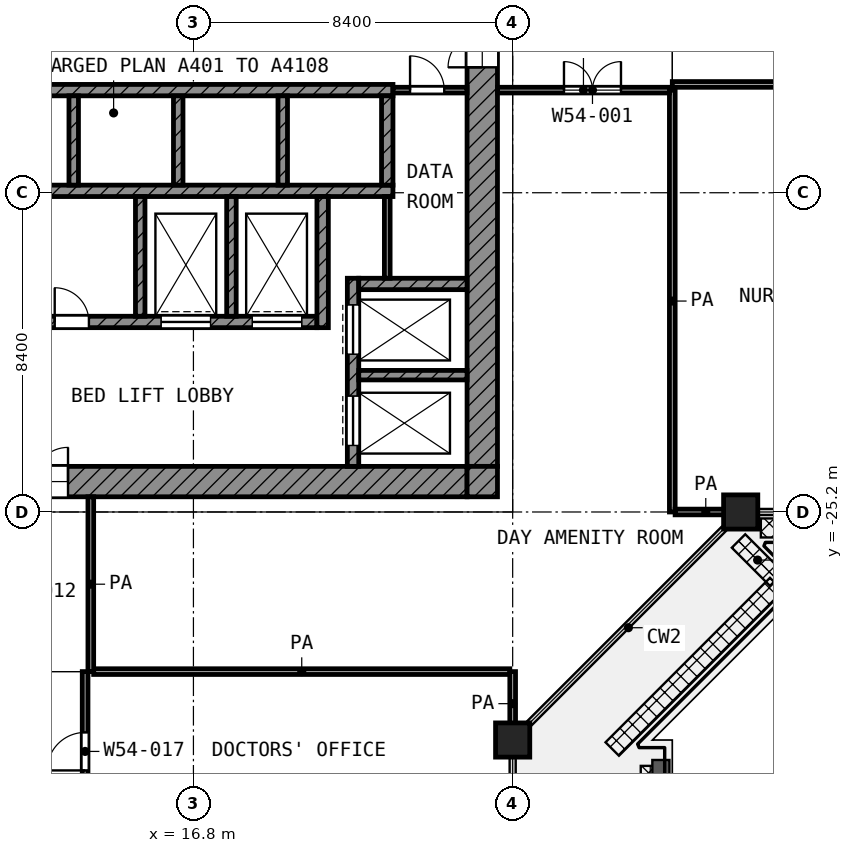
"""IFC4 building model, lengths in metres.
Left out: names, types, materials, properties, quantities, classifications, styles, units other than length and angle.
Written with IfcOpenShell. Run it as: python <this file> out.ifc"""

import sys

from ifc_helpers import new_model, si_unit, direction, frame, frame_2d, origin, origin_2d, place, context, subcontext, project, spatial, rectangle, extrude, element, fill, save


model = new_model("IFC4")
c1 = context("Model", 3, precision=1e-05, world=origin(), true_north=direction((0.0, 1.0)))
c2 = subcontext(c1, "Body", "Model", "MODEL_VIEW")
j1 = project(units=[si_unit("LENGTHUNIT", "METRE"), si_unit("PLANEANGLEUNIT", "RADIAN")], contexts=[c1])
p1 = place(None, origin())
s1 = spatial("IfcSite", under=j1, at=p1, CompositionType="ELEMENT")
p2 = place(p1, origin())
s2 = spatial("IfcBuilding", under=s1, at=p2, CompositionType="ELEMENT")
p3 = place(p2, frame((0.0, 0.0, 234.8)))
s3 = spatial("IfcBuildingStorey", under=s2, at=p3, CompositionType="ELEMENT", Elevation=234.8)
for number, where, z_axis, x_axis in (
    (1, (31.2, -25.2, 0.0), (0.0, 0.0, 1.0), (1.0, 0.0, 0.0)),
    (2, (25.2, -31.2, 0.0), (0.0, 0.0, 1.0), (1.0, 0.0, 0.0)),
):
    element("IfcColumn", number, at=place(p3, frame(where, z_axis=z_axis, x_axis=x_axis)), inside=s3, PredefinedType="COLUMN", context=c2, shape_type="SweptSolid", body=[
        extrude(rectangle(XDim=0.9, YDim=0.9, at=origin_2d()), origin(), (0.0, 0.0, 1.0), 4.2),
    ])
p4 = place(p3, frame((24.4, -24.0, 0.0), z_axis=(0.0, 0.0, 1.0), x_axis=(0.0, 1.0, 0.0)))
e3 = element("IfcWall", 3, at=p4, inside=s3, PredefinedType="SHEAR", context=c2, shape_type="SweptSolid", body=[
    extrude(rectangle(XDim=18.6, YDim=0.8, at=frame_2d((9.3, 0.0))), origin(), (0.0, 0.0, 1.0), 3.6),
])
p5 = place(p4, frame((10.5, 0.0, 0.0)))
e4 = element("IfcOpeningElement", 4, at=p5, cuts=e3, PredefinedType="OPENING", context=c2, shape_type="SweptSolid", body=[
    extrude(rectangle(XDim=1.8, YDim=2.1, at=frame_2d((0.9, 1.05))), frame((0.0, 0.41, 0.0), z_axis=(0.0, -1.0, 0.0), x_axis=(1.0, 0.0, 0.0)), (0.0, 0.0, 1.0), 0.82),
])
p6 = place(p3, frame((5.4, -24.4, 0.0), z_axis=(0.0, 0.0, 1.0), x_axis=(1.0, 0.0, 0.0)))
e5 = element("IfcWall", 5, at=p6, inside=s3, PredefinedType="SHEAR", context=c2, shape_type="SweptSolid", body=[
    extrude(rectangle(XDim=18.6, YDim=0.8, at=frame_2d((9.3, 0.0))), origin(), (0.0, 0.0, 1.0), 3.6),
])
p7 = place(p6, frame((6.3, 0.0, 0.0)))
e6 = element("IfcOpeningElement", 6, at=p7, cuts=e5, PredefinedType="OPENING", context=c2, shape_type="SweptSolid", body=[
    extrude(rectangle(XDim=1.8, YDim=2.1, at=frame_2d((0.9, 1.05))), frame((0.0, 0.41, 0.0), z_axis=(0.0, -1.0, 0.0), x_axis=(1.0, 0.0, 0.0)), (0.0, 0.0, 1.0), 0.82),
])
p8 = place(p3, frame((24.4, -24.8, 0.0), z_axis=(0.0, 0.0, 1.0), x_axis=(0.0, 1.0, 0.0)))
e7 = element("IfcWall", 7, at=p8, inside=s3, PredefinedType="SHEAR", context=c2, shape_type="SweptSolid", body=[
    extrude(rectangle(XDim=0.8, YDim=0.8, at=frame_2d((0.4, 0.0))), origin(), (0.0, 0.0, 1.0), 3.6),
])
p9 = place(p3, frame((5.4, -14.1, 0.0), z_axis=(0.0, 0.0, 1.0), x_axis=(1.0, 0.0, 0.0)))
e8 = element("IfcWall", 8, at=p9, inside=s3, PredefinedType="SHEAR", context=c2, shape_type="SweptSolid", body=[
    extrude(rectangle(XDim=16.65, YDim=0.3, at=frame_2d((8.325, 0.0))), origin(), (0.0, 0.0, 1.0), 3.6),
])
p10 = place(p9, frame((0.825, 0.0, 0.0)))
e9 = element("IfcOpeningElement", 9, at=p10, cuts=e8, PredefinedType="OPENING", context=c2, shape_type="SweptSolid", body=[
    extrude(rectangle(XDim=1.1, YDim=2.1, at=frame_2d((0.55, 1.05))), frame((0.0, 0.16, 0.0), z_axis=(0.0, -1.0, 0.0), x_axis=(1.0, 0.0, 0.0)), (0.0, 0.0, 1.0), 0.32),
])
p11 = place(p9, frame((3.575, 0.0, 0.0)))
e10 = element("IfcOpeningElement", 10, at=p11, cuts=e8, PredefinedType="OPENING", context=c2, shape_type="SweptSolid", body=[
    extrude(rectangle(XDim=1.1, YDim=2.1, at=frame_2d((0.55, 1.05))), frame((0.0, 0.16, 0.0), z_axis=(0.0, -1.0, 0.0), x_axis=(1.0, 0.0, 0.0)), (0.0, 0.0, 1.0), 0.32),
])
p12 = place(p3, frame((5.4, -16.75, 0.0), z_axis=(0.0, 0.0, 1.0), x_axis=(1.0, 0.0, 0.0)))
e11 = element("IfcWall", 11, at=p12, inside=s3, PredefinedType="SHEAR", context=c2, shape_type="SweptSolid", body=[
    extrude(rectangle(XDim=16.65, YDim=0.3, at=frame_2d((8.325, 0.0))), origin(), (0.0, 0.0, 1.0), 3.6),
])
p13 = place(p3, frame((5.4, -20.2, 0.0), z_axis=(0.0, 0.0, 1.0), x_axis=(1.0, 0.0, 0.0)))
e12 = element("IfcWall", 12, at=p13, inside=s3, PredefinedType="SHEAR", context=c2, shape_type="SweptSolid", body=[
    extrude(rectangle(XDim=14.65, YDim=0.3, at=frame_2d((7.325, 0.0))), origin(), (0.0, 0.0, 1.0), 3.6),
])
p14 = place(p13, frame((10.55, 0.0, 0.0)))
e13 = element("IfcOpeningElement", 13, at=p14, cuts=e12, PredefinedType="OPENING", context=c2, shape_type="SweptSolid", body=[
    extrude(rectangle(XDim=1.3, YDim=2.1, at=frame_2d((0.65, 1.05))), frame((0.0, 0.16, 0.0), z_axis=(0.0, -1.0, 0.0), x_axis=(1.0, 0.0, 0.0)), (0.0, 0.0, 1.0), 0.32),
])
p15 = place(p13, frame((12.95, 0.0, 0.0)))
e14 = element("IfcOpeningElement", 14, at=p15, cuts=e12, PredefinedType="OPENING", context=c2, shape_type="SweptSolid", body=[
    extrude(rectangle(XDim=1.3, YDim=2.1, at=frame_2d((0.65, 1.05))), frame((0.0, 0.16, 0.0), z_axis=(0.0, -1.0, 0.0), x_axis=(1.0, 0.0, 0.0)), (0.0, 0.0, 1.0), 0.32),
])
p16 = place(p13, frame((0.55, 0.0, 0.0)))
e15 = element("IfcOpeningElement", 15, at=p16, cuts=e12, PredefinedType="OPENING", context=c2, shape_type="SweptSolid", body=[
    extrude(rectangle(XDim=1.3, YDim=2.1, at=frame_2d((0.65, 1.05))), frame((0.0, 0.16, 0.0), z_axis=(0.0, -1.0, 0.0), x_axis=(1.0, 0.0, 0.0)), (0.0, 0.0, 1.0), 0.32),
])
p17 = place(p13, frame((2.95, 0.0, 0.0)))
e16 = element("IfcOpeningElement", 16, at=p17, cuts=e12, PredefinedType="OPENING", context=c2, shape_type="SweptSolid", body=[
    extrude(rectangle(XDim=1.3, YDim=2.1, at=frame_2d((0.65, 1.05))), frame((0.0, 0.16, 0.0), z_axis=(0.0, -1.0, 0.0), x_axis=(1.0, 0.0, 0.0)), (0.0, 0.0, 1.0), 0.32),
])
p18 = place(p13, frame((5.35, 0.0, 0.0)))
e17 = element("IfcOpeningElement", 17, at=p18, cuts=e12, PredefinedType="OPENING", context=c2, shape_type="SweptSolid", body=[
    extrude(rectangle(XDim=0.9, YDim=2.1, at=frame_2d((0.45, 1.05))), frame((0.0, 0.16, 0.0), z_axis=(0.0, -1.0, 0.0), x_axis=(1.0, 0.0, 0.0)), (0.0, 0.0, 1.0), 0.32),
])
p19 = place(p13, frame((7.75, 0.0, 0.0)))
e18 = element("IfcOpeningElement", 18, at=p19, cuts=e12, PredefinedType="OPENING", context=c2, shape_type="SweptSolid", body=[
    extrude(rectangle(XDim=0.9, YDim=2.1, at=frame_2d((0.45, 1.05))), frame((0.0, 0.16, 0.0), z_axis=(0.0, -1.0, 0.0), x_axis=(1.0, 0.0, 0.0)), (0.0, 0.0, 1.0), 0.32),
])
p20 = place(p3, frame((20.2, -20.35, 0.0), z_axis=(0.0, 0.0, 1.0), x_axis=(0.0, 1.0, 0.0)))
e19 = element("IfcWall", 19, at=p20, inside=s3, PredefinedType="SHEAR", context=c2, shape_type="SweptSolid", body=[
    extrude(rectangle(XDim=3.45, YDim=0.3, at=frame_2d((1.725, 0.0))), origin(), (0.0, 0.0, 1.0), 3.6),
])
p21 = place(p3, frame((21.9, -16.6, 0.0), z_axis=(0.0, 0.0, 1.0), x_axis=(0.0, 1.0, 0.0)))
e20 = element("IfcWall", 20, at=p21, inside=s3, PredefinedType="SHEAR", context=c2, shape_type="SweptSolid", body=[
    extrude(rectangle(XDim=2.35, YDim=0.3, at=frame_2d((1.175, 0.0))), origin(), (0.0, 0.0, 1.0), 3.6),
])
p22 = place(p3, frame((21.15, -19.2, 0.0), z_axis=(0.0, 0.0, 1.0), x_axis=(1.0, 0.0, 0.0)))
e21 = element("IfcWall", 21, at=p22, inside=s3, PredefinedType="SHEAR", context=c2, shape_type="SweptSolid", body=[
    extrude(rectangle(XDim=2.85, YDim=0.3, at=frame_2d((1.425, 0.0))), origin(), (0.0, 0.0, 1.0), 3.6),
])
p23 = place(p3, frame((21.0, -24.0, 0.0), z_axis=(0.0, 0.0, 1.0), x_axis=(0.0, 1.0, 0.0)))
e22 = element("IfcWall", 22, at=p23, inside=s3, PredefinedType="SHEAR", context=c2, shape_type="SweptSolid", body=[
    extrude(rectangle(XDim=4.95, YDim=0.3, at=frame_2d((2.475, 0.0))), origin(), (0.0, 0.0, 1.0), 3.6),
])
p24 = place(p23, frame((2.95, 0.0, 0.0)))
e23 = element("IfcOpeningElement", 23, at=p24, cuts=e22, PredefinedType="OPENING", context=c2, shape_type="SweptSolid", body=[
    extrude(rectangle(XDim=1.3, YDim=2.1, at=frame_2d((0.65, 1.05))), frame((0.0, 0.16, 0.0), z_axis=(0.0, -1.0, 0.0), x_axis=(1.0, 0.0, 0.0)), (0.0, 0.0, 1.0), 0.32),
])
p25 = place(p23, frame((0.55, 0.0, 0.0)))
e24 = element("IfcOpeningElement", 24, at=p25, cuts=e22, PredefinedType="OPENING", context=c2, shape_type="SweptSolid", body=[
    extrude(rectangle(XDim=1.3, YDim=2.1, at=frame_2d((0.65, 1.05))), frame((0.0, 0.16, 0.0), z_axis=(0.0, -1.0, 0.0), x_axis=(1.0, 0.0, 0.0)), (0.0, 0.0, 1.0), 0.32),
])
p26 = place(p3, frame((21.15, -21.6, 0.0), z_axis=(0.0, 0.0, 1.0), x_axis=(1.0, 0.0, 0.0)))
e25 = element("IfcWall", 25, at=p26, inside=s3, PredefinedType="SHEAR", context=c2, shape_type="SweptSolid", body=[
    extrude(rectangle(XDim=2.85, YDim=0.25, at=frame_2d((1.425, 0.0))), origin(), (0.0, 0.0, 1.0), 3.6),
])
for number, where, z_axis, x_axis in (
    (26, (15.4, -20.05, 0.0), (0.0, 0.0, 1.0), (0.0, 1.0, 0.0)),
    (27, (17.8, -20.05, 0.0), (0.0, 0.0, 1.0), (0.0, 1.0, 0.0)),
):
    element("IfcWall", number, at=place(p3, frame(where, z_axis=z_axis, x_axis=x_axis)), inside=s3, PredefinedType="SHEAR", context=c2, shape_type="SweptSolid", body=[
        extrude(rectangle(XDim=3.15, YDim=0.25, at=frame_2d((1.575, 0.0))), origin(), (0.0, 0.0, 1.0), 3.6),
    ])
for number, where, z_axis, x_axis in (
    (28, (13.65, -16.6, 0.0), (0.0, 0.0, 1.0), (0.0, 1.0, 0.0)),
    (29, (16.4, -16.6, 0.0), (0.0, 0.0, 1.0), (0.0, 1.0, 0.0)),
    (30, (19.15, -16.6, 0.0), (0.0, 0.0, 1.0), (0.0, 1.0, 0.0)),
):
    element("IfcWall", number, at=place(p3, frame(where, z_axis=z_axis, x_axis=x_axis)), inside=s3, PredefinedType="SHEAR", context=c2, shape_type="SweptSolid", body=[
        extrude(rectangle(XDim=2.35, YDim=0.25, at=frame_2d((1.175, 0.0))), origin(), (0.0, 0.0, 1.0), 3.6),
    ])
p27 = place(p3, frame((21.9, -19.05, 0.0), z_axis=(0.0, 0.0, 1.0), x_axis=(0.0, 1.0, 0.0)))
e31 = element("IfcWall", 31, at=p27, inside=s3, PredefinedType="PARTITIONING", context=c2, shape_type="SweptSolid", body=[
    extrude(rectangle(XDim=2.15, YDim=0.15, at=frame_2d((1.075, 0.0))), origin(), (0.0, 0.0, 1.0), 3.6),
])
p28 = place(p3, frame((22.05, -14.1, 0.0), z_axis=(0.0, 0.0, 1.0), x_axis=(1.0, 0.0, 0.0)))
e32 = element("IfcWall", 32, at=p28, inside=s3, PredefinedType="PARTITIONING", context=c2, shape_type="SweptSolid", body=[
    extrude(rectangle(XDim=1.95, YDim=0.15, at=frame_2d((0.975, 0.0))), origin(), (0.0, 0.0, 1.0), 3.6),
])
p29 = place(p28, frame((0.45, 0.0, 0.0)))
e33 = element("IfcOpeningElement", 33, at=p29, cuts=e32, PredefinedType="OPENING", context=c2, shape_type="SweptSolid", body=[
    extrude(rectangle(XDim=0.9, YDim=2.1, at=frame_2d((0.45, 1.05))), frame((0.0, 0.085, 0.0), z_axis=(0.0, -1.0, 0.0), x_axis=(1.0, 0.0, 0.0)), (0.0, 0.0, 1.0), 0.17),
])
p30 = place(p3, frame((14.175, -29.4, 0.0), z_axis=(0.0, 0.0, 1.0), x_axis=(1.0, 0.0, 0.0)))
e34 = element("IfcWall", 34, at=p30, inside=s3, PredefinedType="PARTITIONING", context=c2, shape_type="SweptSolid", body=[
    extrude(rectangle(XDim=10.95, YDim=0.15, at=frame_2d((5.475, 0.0))), origin(), (0.0, 0.0, 1.0), 3.6),
])
p31 = place(p3, frame((29.475, -25.2, 0.0), z_axis=(0.0, 0.0, 1.0), x_axis=(1.0, 0.0, 0.0)))
e35 = element("IfcWall", 35, at=p31, inside=s3, PredefinedType="PARTITIONING", context=c2, shape_type="SweptSolid", body=[
    extrude(rectangle(XDim=1.612, YDim=0.15, at=frame_2d((0.806, 0.0))), origin(), (0.0, 0.0, 1.0), 3.6),
])
p32 = place(p3, frame((24.8, -14.1, 0.0), z_axis=(0.0, 0.0, 1.0), x_axis=(1.0, 0.0, 0.0)))
e36 = element("IfcWall", 36, at=p32, inside=s3, PredefinedType="PARTITIONING", context=c2, shape_type="SweptSolid", body=[
    extrude(rectangle(XDim=4.525, YDim=0.15, at=frame_2d((2.262, 0.0))), origin(), (0.0, 0.0, 1.0), 3.6),
])
p33 = place(p32, frame((1.75, 0.0, 0.0)))
e37 = element("IfcOpeningElement", 37, at=p33, cuts=e36, PredefinedType="OPENING", context=c2, shape_type="SweptSolid", body=[
    extrude(rectangle(XDim=1.5, YDim=2.1, at=frame_2d((0.75, 1.05))), frame((0.0, 0.085, 0.0), z_axis=(0.0, -1.0, 0.0), x_axis=(1.0, 0.0, 0.0)), (0.0, 0.0, 1.0), 0.17),
])
p34 = place(p3, frame((29.4, -13.95, 0.0), z_axis=(0.0, 0.0, 1.0), x_axis=(1.0, 0.0, 0.0)))
e38 = element("IfcWall", 38, at=p34, inside=s3, PredefinedType="PARTITIONING", context=c2, shape_type="SweptSolid", body=[
    extrude(rectangle(XDim=33.52, YDim=0.15, at=frame_2d((16.76, 0.0))), origin(), (0.0, 0.0, 1.0), 2.7),
])
p35 = place(p34, frame((3.45, 0.0, 0.0)))
e39 = element("IfcOpeningElement", 39, at=p35, cuts=e38, PredefinedType="OPENING", context=c2, shape_type="SweptSolid", body=[
    extrude(rectangle(XDim=1.2, YDim=2.1, at=frame_2d((0.6, 1.05))), frame((0.0, 0.085, 0.0), z_axis=(0.0, -1.0, 0.0), x_axis=(1.0, 0.0, 0.0)), (0.0, 0.0, 1.0), 0.17),
])
p36 = place(p34, frame((11.2, 0.0, 0.0)))
e40 = element("IfcOpeningElement", 40, at=p36, cuts=e38, PredefinedType="OPENING", context=c2, shape_type="SweptSolid", body=[
    extrude(rectangle(XDim=1.2, YDim=2.1, at=frame_2d((0.6, 1.05))), frame((0.0, 0.085, 0.0), z_axis=(0.0, -1.0, 0.0), x_axis=(1.0, 0.0, 0.0)), (0.0, 0.0, 1.0), 0.17),
])
p37 = place(p34, frame((13.6, 0.0, 0.0)))
e41 = element("IfcOpeningElement", 41, at=p37, cuts=e38, PredefinedType="OPENING", context=c2, shape_type="SweptSolid", body=[
    extrude(rectangle(XDim=1.2, YDim=2.1, at=frame_2d((0.6, 1.05))), frame((0.0, 0.085, 0.0), z_axis=(0.0, -1.0, 0.0), x_axis=(1.0, 0.0, 0.0)), (0.0, 0.0, 1.0), 0.17),
])
p38 = place(p34, frame((21.075, 0.0, 0.0)))
e42 = element("IfcOpeningElement", 42, at=p38, cuts=e38, PredefinedType="OPENING", context=c2, shape_type="SweptSolid", body=[
    extrude(rectangle(XDim=1.2, YDim=2.1, at=frame_2d((0.6, 1.05))), frame((0.0, 0.085, 0.0), z_axis=(0.0, -1.0, 0.0), x_axis=(1.0, 0.0, 0.0)), (0.0, 0.0, 1.0), 0.17),
])
p39 = place(p34, frame((19.55, 0.0, 0.0)))
e43 = element("IfcOpeningElement", 43, at=p39, cuts=e38, PredefinedType="OPENING", context=c2, shape_type="SweptSolid", body=[
    extrude(rectangle(XDim=1.2, YDim=2.1, at=frame_2d((0.6, 1.05))), frame((0.0, 0.085, 0.0), z_axis=(0.0, -1.0, 0.0), x_axis=(1.0, 0.0, 0.0)), (0.0, 0.0, 1.0), 0.17),
])
p40 = place(p34, frame((22.95, 0.0, 0.0)))
e44 = element("IfcOpeningElement", 44, at=p40, cuts=e38, PredefinedType="OPENING", context=c2, shape_type="SweptSolid", body=[
    extrude(rectangle(XDim=1.2, YDim=2.1, at=frame_2d((0.6, 1.05))), frame((0.0, 0.085, 0.0), z_axis=(0.0, -1.0, 0.0), x_axis=(1.0, 0.0, 0.0)), (0.0, 0.0, 1.0), 0.17),
])
p41 = place(p34, frame((28.35, 0.0, 0.0)))
e45 = element("IfcOpeningElement", 45, at=p41, cuts=e38, PredefinedType="OPENING", context=c2, shape_type="SweptSolid", body=[
    extrude(rectangle(XDim=1.5, YDim=2.1, at=frame_2d((0.75, 1.05))), frame((0.0, 0.085, 0.0), z_axis=(0.0, -1.0, 0.0), x_axis=(1.0, 0.0, 0.0)), (0.0, 0.0, 1.0), 0.17),
])
p42 = place(p3, frame((13.95, -46.12, 0.0), z_axis=(0.0, 0.0, 1.0), x_axis=(0.0, 1.0, 0.0)))
e46 = element("IfcWall", 46, at=p42, inside=s3, PredefinedType="PARTITIONING", context=c2, shape_type="SweptSolid", body=[
    extrude(rectangle(XDim=16.72, YDim=0.15, at=frame_2d((8.36, 0.0))), origin(), (0.0, 0.0, 1.0), 3.6),
])
p43 = place(p42, frame((14.12, 0.0, 0.0)))
e47 = element("IfcOpeningElement", 47, at=p43, cuts=e46, PredefinedType="OPENING", context=c2, shape_type="SweptSolid", body=[
    extrude(rectangle(XDim=1.0, YDim=2.1, at=frame_2d((0.5, 1.05))), frame((0.0, 0.085, 0.0), z_axis=(0.0, -1.0, 0.0), x_axis=(1.0, 0.0, 0.0)), (0.0, 0.0, 1.0), 0.17),
])
p44 = place(p42, frame((9.82, 0.0, 0.0)))
e48 = element("IfcOpeningElement", 48, at=p44, cuts=e46, PredefinedType="OPENING", context=c2, shape_type="SweptSolid", body=[
    extrude(rectangle(XDim=1.2, YDim=2.1, at=frame_2d((0.6, 1.05))), frame((0.0, 0.085, 0.0), z_axis=(0.0, -1.0, 0.0), x_axis=(1.0, 0.0, 0.0)), (0.0, 0.0, 1.0), 0.17),
])
p45 = place(p42, frame((5.72, 0.0, 0.0)))
e49 = element("IfcOpeningElement", 49, at=p45, cuts=e46, PredefinedType="OPENING", context=c2, shape_type="SweptSolid", body=[
    extrude(rectangle(XDim=1.0, YDim=2.1, at=frame_2d((0.5, 1.05))), frame((0.0, 0.085, 0.0), z_axis=(0.0, -1.0, 0.0), x_axis=(1.0, 0.0, 0.0)), (0.0, 0.0, 1.0), 0.17),
])
p46 = place(p42, frame((1.52, 0.0, 0.0)))
e50 = element("IfcOpeningElement", 50, at=p46, cuts=e46, PredefinedType="OPENING", context=c2, shape_type="SweptSolid", body=[
    extrude(rectangle(XDim=1.0, YDim=2.1, at=frame_2d((0.5, 1.05))), frame((0.0, 0.085, 0.0), z_axis=(0.0, -1.0, 0.0), x_axis=(1.0, 0.0, 0.0)), (0.0, 0.0, 1.0), 0.17),
])
p47 = place(p3, frame((14.1, -29.4, 0.0), z_axis=(0.0, 0.0, 1.0), x_axis=(0.0, 1.0, 0.0)))
e51 = element("IfcWall", 51, at=p47, inside=s3, PredefinedType="PARTITIONING", context=c2, shape_type="SweptSolid", body=[
    extrude(rectangle(XDim=4.6, YDim=0.15, at=frame_2d((2.3, 0.0))), origin(), (0.0, 0.0, 1.0), 3.6),
])
p48 = place(p3, frame((25.2, -31.087, 0.0), z_axis=(0.0, 0.0, 1.0), x_axis=(0.0, 1.0, 0.0)))
e52 = element("IfcWall", 52, at=p48, inside=s3, PredefinedType="PARTITIONING", context=c2, shape_type="SweptSolid", body=[
    extrude(rectangle(XDim=1.687, YDim=0.15, at=frame_2d((0.844, 0.0))), origin(), (0.0, 0.0, 1.0), 3.6),
])
p49 = place(p3, frame((29.4, -25.2, 0.0), z_axis=(0.0, 0.0, 1.0), x_axis=(0.0, 1.0, 0.0)))
e53 = element("IfcWall", 53, at=p49, inside=s3, PredefinedType="PARTITIONING", context=c2, shape_type="SweptSolid", body=[
    extrude(rectangle(XDim=11.1, YDim=0.15, at=frame_2d((5.55, 0.0))), origin(), (0.0, 0.0, 1.0), 3.6),
])
p50 = place(p24, origin())
e54 = element("IfcDoor", 54, at=p50, inside=s3, OperationType="DOUBLE_DOOR_SLIDING", PredefinedType="DOOR", context=c2, shape_type="SweptSolid", body=[
    extrude(rectangle(XDim=1.3, YDim=2.1, at=frame_2d((0.65, 1.05))), frame((0.0, 0.025, 0.0), z_axis=(0.0, -1.0, 0.0), x_axis=(1.0, 0.0, 0.0)), (0.0, 0.0, 1.0), 0.05),
])
fill(e23, e54)
p51 = place(p25, origin())
e55 = element("IfcDoor", 55, at=p51, inside=s3, OperationType="DOUBLE_DOOR_SLIDING", PredefinedType="DOOR", context=c2, shape_type="SweptSolid", body=[
    extrude(rectangle(XDim=1.3, YDim=2.1, at=frame_2d((0.65, 1.05))), frame((0.0, 0.025, 0.0), z_axis=(0.0, -1.0, 0.0), x_axis=(1.0, 0.0, 0.0)), (0.0, 0.0, 1.0), 0.05),
])
fill(e24, e55)
p52 = place(p14, origin())
e56 = element("IfcDoor", 56, at=p52, inside=s3, OperationType="DOUBLE_DOOR_SLIDING", PredefinedType="DOOR", context=c2, shape_type="SweptSolid", body=[
    extrude(rectangle(XDim=1.3, YDim=2.1, at=frame_2d((0.65, 1.05))), frame((0.0, 0.025, 0.0), z_axis=(0.0, -1.0, 0.0), x_axis=(1.0, 0.0, 0.0)), (0.0, 0.0, 1.0), 0.05),
])
fill(e13, e56)
p53 = place(p15, origin())
e57 = element("IfcDoor", 57, at=p53, inside=s3, OperationType="DOUBLE_DOOR_SLIDING", PredefinedType="DOOR", context=c2, shape_type="SweptSolid", body=[
    extrude(rectangle(XDim=1.3, YDim=2.1, at=frame_2d((0.65, 1.05))), frame((0.0, 0.025, 0.0), z_axis=(0.0, -1.0, 0.0), x_axis=(1.0, 0.0, 0.0)), (0.0, 0.0, 1.0), 0.05),
])
fill(e14, e57)
p54 = place(p5, origin())
e58 = element("IfcDoor", 58, at=p54, inside=s3, OperationType="DOUBLE_DOOR_SINGLE_SWING", PredefinedType="DOOR", context=c2, shape_type="SweptSolid", body=[
    extrude(rectangle(XDim=1.8, YDim=2.1, at=frame_2d((0.9, 1.05))), frame((0.0, 0.025, 0.0), z_axis=(0.0, -1.0, 0.0), x_axis=(1.0, 0.0, 0.0)), (0.0, 0.0, 1.0), 0.05),
])
fill(e4, e58)
p55 = place(p7, origin())
e59 = element("IfcDoor", 59, at=p55, inside=s3, OperationType="DOUBLE_DOOR_SINGLE_SWING", PredefinedType="DOOR", context=c2, shape_type="SweptSolid", body=[
    extrude(rectangle(XDim=1.8, YDim=2.1, at=frame_2d((0.9, 1.05))), frame((0.0, 0.025, 0.0), z_axis=(0.0, -1.0, 0.0), x_axis=(1.0, 0.0, 0.0)), (0.0, 0.0, 1.0), 0.05),
])
fill(e6, e59)
p56 = place(p29, origin())
e60 = element("IfcDoor", 60, at=p56, inside=s3, OperationType="SINGLE_SWING_LEFT", PredefinedType="DOOR", context=c2, shape_type="SweptSolid", body=[
    extrude(rectangle(XDim=0.9, YDim=2.1, at=frame_2d((0.45, 1.05))), frame((0.0, 0.025, 0.0), z_axis=(0.0, -1.0, 0.0), x_axis=(1.0, 0.0, 0.0)), (0.0, 0.0, 1.0), 0.05),
])
fill(e33, e60)
p57 = place(p19, origin())
e61 = element("IfcDoor", 61, at=p57, inside=s3, OperationType="SINGLE_SWING_LEFT", PredefinedType="DOOR", context=c2, shape_type="SweptSolid", body=[
    extrude(rectangle(XDim=0.9, YDim=2.1, at=frame_2d((0.45, 1.05))), frame((0.0, 0.025, 0.0), z_axis=(0.0, -1.0, 0.0), x_axis=(1.0, 0.0, 0.0)), (0.0, 0.0, 1.0), 0.05),
])
fill(e18, e61)
p58 = place(p33, origin())
e62 = element("IfcDoor", 62, at=p58, inside=s3, OperationType="DOUBLE_DOOR_SINGLE_SWING", PredefinedType="DOOR", context=c2, shape_type="SweptSolid", body=[
    extrude(rectangle(XDim=1.5, YDim=2.1, at=frame_2d((0.75, 1.05))), frame((0.0, 0.025, 0.0), z_axis=(0.0, -1.0, 0.0), x_axis=(1.0, 0.0, 0.0)), (0.0, 0.0, 1.0), 0.05),
])
fill(e37, e62)
p59 = place(p43, origin())
e63 = element("IfcDoor", 63, at=p59, inside=s3, OperationType="SINGLE_SWING_LEFT", PredefinedType="DOOR", context=c2, shape_type="SweptSolid", body=[
    extrude(rectangle(XDim=1.0, YDim=2.1, at=frame_2d((0.5, 1.05))), frame((0.0, 0.025, 0.0), z_axis=(0.0, -1.0, 0.0), x_axis=(1.0, 0.0, 0.0)), (0.0, 0.0, 1.0), 0.05),
])
fill(e47, e63)
save(model, sys.argv[1])
